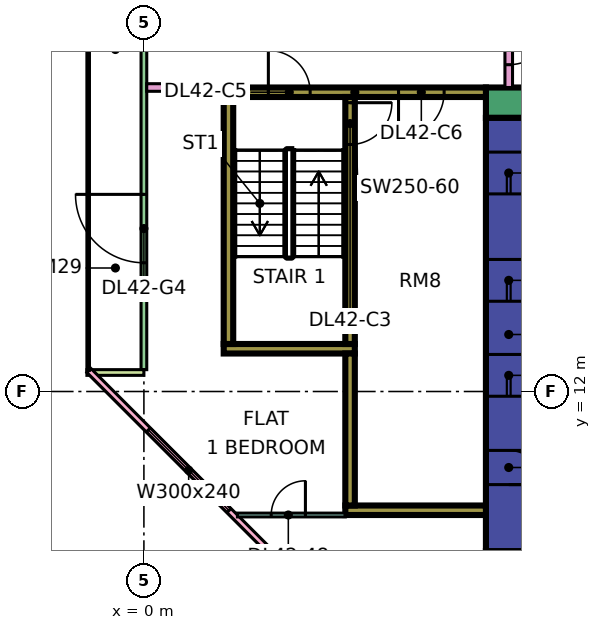
"""IFC4 building model, lengths in metres.
Left out: names, types, materials, properties, quantities, classifications, styles, units other than length and angle.
Written with IfcOpenShell. Run it as: python <this file> out.ifc"""

import sys

from ifc_helpers import new_model, si_unit, direction, frame, frame_2d, origin, place, context, subcontext, project, spatial, rectangle, extrude, element, fill, save


model = new_model("IFC4")
c1 = context("Model", 3, precision=1e-05, world=origin(), true_north=direction((0.0, 1.0)))
c2 = subcontext(c1, "Body", "Model", "MODEL_VIEW")
j1 = project(units=[si_unit("LENGTHUNIT", "METRE"), si_unit("PLANEANGLEUNIT", "RADIAN")], contexts=[c1])
p1 = place(None, origin())
s1 = spatial("IfcSite", under=j1, at=p1, CompositionType="ELEMENT")
p2 = place(p1, origin())
s2 = spatial("IfcBuilding", under=s1, at=p2, CompositionType="ELEMENT")
p3 = place(p2, frame((0.0, 0.0, 183.65)))
s3 = spatial("IfcBuildingStorey", under=s2, at=p3, CompositionType="ELEMENT", Elevation=183.65)
p4 = place(p3, frame((9.0, 19.6, 0.0), z_axis=(0.0, 0.0, 1.0), x_axis=(1.0, 0.0, 0.0)))
e1 = element("IfcWall", 1, at=p4, inside=s3, PredefinedType="SHEAR", context=c2, shape_type="SweptSolid", body=[
    extrude(rectangle(XDim=25.0, YDim=0.8, at=frame_2d((12.5, 0.0))), origin(), (0.0, 0.0, 1.0), 3.75),
])
p5 = place(p4, frame((19.1, 0.0, 0.0)))
e2 = element("IfcOpeningElement", 2, at=p5, cuts=e1, PredefinedType="OPENING", context=c2, shape_type="SweptSolid", body=[
    extrude(rectangle(XDim=1.8, YDim=2.4, at=frame_2d((0.9, 1.2))), frame((0.0, 0.41, 0.0), z_axis=(0.0, -1.0, 0.0), x_axis=(1.0, 0.0, 0.0)), (0.0, 0.0, 1.0), 0.82),
])
p6 = place(p3, frame((9.6, 7.8, 0.0), z_axis=(0.0, 0.0, 1.0), x_axis=(0.0, 1.0, 0.0)))
e3 = element("IfcWall", 3, at=p6, inside=s3, PredefinedType="SHEAR", context=c2, shape_type="SweptSolid", body=[
    extrude(rectangle(XDim=11.4, YDim=1.2, at=frame_2d((5.7, 0.0))), origin(), (0.0, 0.0, 1.0), 3.75),
])
p7 = place(p6, frame((4.075, 0.0, 0.0)))
e4 = element("IfcOpeningElement", 4, at=p7, cuts=e3, PredefinedType="OPENING", context=c2, shape_type="SweptSolid", body=[
    extrude(rectangle(XDim=1.1, YDim=2.2, at=frame_2d((0.55, 1.1))), frame((0.0, 0.61, 0.0), z_axis=(0.0, -1.0, 0.0), x_axis=(1.0, 0.0, 0.0)), (0.0, 0.0, 1.0), 1.22),
])
p8 = place(p6, frame((6.575, 0.0, 0.0)))
e5 = element("IfcOpeningElement", 5, at=p8, cuts=e3, PredefinedType="OPENING", context=c2, shape_type="SweptSolid", body=[
    extrude(rectangle(XDim=1.1, YDim=2.2, at=frame_2d((0.55, 1.1))), frame((0.0, 0.61, 0.0), z_axis=(0.0, -1.0, 0.0), x_axis=(1.0, 0.0, 0.0)), (0.0, 0.0, 1.0), 1.22),
])
p9 = place(p6, frame((9.4, 0.0, 0.0)))
e6 = element("IfcOpeningElement", 6, at=p9, cuts=e3, PredefinedType="OPENING", context=c2, shape_type="SweptSolid", body=[
    extrude(rectangle(XDim=1.1, YDim=2.2, at=frame_2d((0.55, 1.1))), frame((0.0, 0.61, 0.0), z_axis=(0.0, -1.0, 0.0), x_axis=(1.0, 0.0, 0.0)), (0.0, 0.0, 1.0), 1.22),
])
p10 = place(p6, frame((1.75, 0.0, 0.0)))
e7 = element("IfcOpeningElement", 7, at=p10, cuts=e3, PredefinedType="OPENING", context=c2, shape_type="SweptSolid", body=[
    extrude(rectangle(XDim=0.9, YDim=2.1, at=frame_2d((0.45, 1.05))), frame((0.0, 0.61, 0.0), z_axis=(0.0, -1.0, 0.0), x_axis=(1.0, 0.0, 0.0)), (0.0, 0.0, 1.0), 1.22),
])
p11 = place(p3, frame((2.1, 19.875, 0.0), z_axis=(0.0, 0.0, 1.0), x_axis=(1.0, 0.0, 0.0)))
e8 = element("IfcWall", 8, at=p11, inside=s3, PredefinedType="SHEAR", context=c2, shape_type="SweptSolid", body=[
    extrude(rectangle(XDim=6.9, YDim=0.25, at=frame_2d((3.45, 0.0))), origin(), (0.0, 0.0, 1.0), 3.75),
])
p12 = place(p11, frame((1.175, 0.0, 0.0)))
e9 = element("IfcOpeningElement", 9, at=p12, cuts=e8, PredefinedType="OPENING", context=c2, shape_type="SweptSolid", body=[
    extrude(rectangle(XDim=1.1, YDim=2.2, at=frame_2d((0.55, 1.1))), frame((0.0, 0.135, 0.0), z_axis=(0.0, -1.0, 0.0), x_axis=(1.0, 0.0, 0.0)), (0.0, 0.0, 1.0), 0.27),
])
p13 = place(p11, frame((4.6, 0.0, 0.0)))
e10 = element("IfcOpeningElement", 10, at=p13, cuts=e8, PredefinedType="OPENING", context=c2, shape_type="SweptSolid", body=[
    extrude(rectangle(XDim=1.2, YDim=2.2, at=frame_2d((0.6, 1.1))), frame((0.0, 0.135, 0.0), z_axis=(0.0, -1.0, 0.0), x_axis=(1.0, 0.0, 0.0)), (0.0, 0.0, 1.0), 0.27),
])
p14 = place(p3, frame((2.1, 13.125, 0.0), z_axis=(0.0, 0.0, 1.0), x_axis=(1.0, 0.0, 0.0)))
e11 = element("IfcWall", 11, at=p14, inside=s3, PredefinedType="SHEAR", context=c2, shape_type="SweptSolid", body=[
    extrude(rectangle(XDim=3.45, YDim=0.25, at=frame_2d((1.725, 0.0))), origin(), (0.0, 0.0, 1.0), 3.75),
])
p15 = place(p3, frame((2.225, 13.25, 0.0), z_axis=(0.0, 0.0, 1.0), x_axis=(0.0, 1.0, 0.0)))
e12 = element("IfcWall", 12, at=p15, inside=s3, PredefinedType="SHEAR", context=c2, shape_type="SweptSolid", body=[
    extrude(rectangle(XDim=6.5, YDim=0.25, at=frame_2d((3.25, 0.0))), origin(), (0.0, 0.0, 1.0), 3.75),
])
p16 = place(p3, frame((5.425, 13.25, 0.0), z_axis=(0.0, 0.0, 1.0), x_axis=(0.0, 1.0, 0.0)))
e13 = element("IfcWall", 13, at=p16, inside=s3, PredefinedType="SHEAR", context=c2, shape_type="SweptSolid", body=[
    extrude(rectangle(XDim=6.5, YDim=0.25, at=frame_2d((3.25, 0.0))), origin(), (0.0, 0.0, 1.0), 3.75),
])
p17 = place(p16, frame((5.25, 0.0, 0.0)))
e14 = element("IfcOpeningElement", 14, at=p17, cuts=e13, PredefinedType="OPENING", context=c2, shape_type="SweptSolid", body=[
    extrude(rectangle(XDim=1.1, YDim=2.2, at=frame_2d((0.55, 1.1))), frame((0.0, 0.135, 0.0), z_axis=(0.0, -1.0, 0.0), x_axis=(1.0, 0.0, 0.0)), (0.0, 0.0, 1.0), 0.27),
])
p18 = place(p3, frame((5.3, 8.875, 0.0), z_axis=(0.0, 0.0, 1.0), x_axis=(1.0, 0.0, 0.0)))
e15 = element("IfcWall", 15, at=p18, inside=s3, PredefinedType="SHEAR", context=c2, shape_type="SweptSolid", body=[
    extrude(rectangle(XDim=3.7, YDim=0.25, at=frame_2d((1.85, 0.0))), origin(), (0.0, 0.0, 1.0), 3.75),
])
p19 = place(p3, frame((5.425, 9.0, 0.0), z_axis=(0.0, 0.0, 1.0), x_axis=(0.0, 1.0, 0.0)))
e16 = element("IfcWall", 16, at=p19, inside=s3, PredefinedType="SHEAR", context=c2, shape_type="SweptSolid", body=[
    extrude(rectangle(XDim=4.0, YDim=0.25, at=frame_2d((2.0, 0.0))), origin(), (0.0, 0.0, 1.0), 3.75),
])
p20 = place(p3, frame((0.0, 23.925, 0.0), z_axis=(0.0, 0.0, 1.0), x_axis=(0.0, -1.0, 0.0)))
e17 = element("IfcWall", 17, at=p20, inside=s3, PredefinedType="SOLIDWALL", context=c2, shape_type="SweptSolid", body=[
    extrude(rectangle(XDim=11.35, YDim=0.15, at=frame_2d((5.675, 0.0))), origin(), (0.0, 0.0, 1.0), 3.35),
])
p21 = place(p20, frame((6.738, 0.0, 0.0)))
e18 = element("IfcOpeningElement", 18, at=p21, cuts=e17, PredefinedType="OPENING", context=c2, shape_type="SweptSolid", body=[
    extrude(rectangle(XDim=1.8, YDim=2.4, at=frame_2d((0.9, 1.2))), frame((0.0, 0.085, 0.0), z_axis=(0.0, -1.0, 0.0), x_axis=(1.0, 0.0, 0.0)), (0.0, 0.0, 1.0), 0.17),
])
p22 = place(p3, frame((-1.5, 12.5, 0.0), z_axis=(0.0, 0.0, 1.0), x_axis=(1.0, 0.0, 0.0)))
e19 = element("IfcWall", 19, at=p22, inside=s3, PredefinedType="SOLIDWALL", context=c2, shape_type="SweptSolid", body=[
    extrude(rectangle(XDim=1.5, YDim=0.15, at=frame_2d((0.75, 0.0))), origin(), (0.0, 0.0, 1.0), 3.35),
])
p23 = place(p3, frame((-1.447, 12.553, 0.0), z_axis=(0.0, 0.0, 1.0), x_axis=(0.707106781187, -0.707106781187, 0.0)))
e20 = element("IfcWall", 20, at=p23, inside=s3, PredefinedType="SOLIDWALL", context=c2, shape_type="SweptSolid", body=[
    extrude(rectangle(XDim=19.799, YDim=0.15, at=frame_2d((9.899, 0.0))), origin(), (0.0, 0.0, 1.0), 3.35),
])
p24 = place(p23, frame((2.212, 0.0, 0.45)))
e21 = element("IfcOpeningElement", 21, at=p24, cuts=e20, PredefinedType="OPENING", context=c2, shape_type="SweptSolid", body=[
    extrude(rectangle(XDim=3.0, YDim=2.4, at=frame_2d((1.5, 1.2))), frame((0.0, 0.085, 0.0), z_axis=(0.0, -1.0, 0.0), x_axis=(1.0, 0.0, 0.0)), (0.0, 0.0, 1.0), 0.17),
])
p25 = place(p23, frame((10.216, 0.0, 0.45)))
e22 = element("IfcOpeningElement", 22, at=p25, cuts=e20, PredefinedType="OPENING", context=c2, shape_type="SweptSolid", body=[
    extrude(rectangle(XDim=3.0, YDim=2.4, at=frame_2d((1.5, 1.2))), frame((0.0, 0.085, 0.0), z_axis=(0.0, -1.0, 0.0), x_axis=(1.0, 0.0, 0.0)), (0.0, 0.0, 1.0), 0.17),
])
p26 = place(p3, frame((0.074, 20.0, 0.0), z_axis=(0.0, 0.0, 1.0), x_axis=(1.0, 0.0, 0.0)))
e23 = element("IfcWall", 23, at=p26, inside=s3, PredefinedType="PARTITIONING", context=c2, shape_type="SweptSolid", body=[
    extrude(rectangle(XDim=2.026, YDim=0.2, at=frame_2d((1.013, 0.0))), origin(), (0.0, 0.0, 1.0), 3.35),
])
p27 = place(p3, frame((2.461, 8.75, 0.0), z_axis=(0.0, 0.0, 1.0), x_axis=(1.0, 0.0, 0.0)))
e24 = element("IfcWall", 24, at=p27, inside=s3, PredefinedType="PARTITIONING", context=c2, shape_type="SweptSolid", body=[
    extrude(rectangle(XDim=2.839, YDim=0.1, at=frame_2d((1.419, 0.0))), origin(), (0.0, 0.0, 1.0), 3.35),
])
p28 = place(p27, frame((0.889, 0.0, 0.0)))
e25 = element("IfcOpeningElement", 25, at=p28, cuts=e24, PredefinedType="OPENING", context=c2, shape_type="SweptSolid", body=[
    extrude(rectangle(XDim=0.9, YDim=2.1, at=frame_2d((0.45, 1.05))), frame((0.0, 0.06, 0.0), z_axis=(0.0, -1.0, 0.0), x_axis=(1.0, 0.0, 0.0)), (0.0, 0.0, 1.0), 0.12),
])
p29 = place(p3, frame((9.6, 20.0, 0.0), z_axis=(0.0, 0.0, 1.0), x_axis=(0.0, 1.0, 0.0)))
e26 = element("IfcWall", 26, at=p29, inside=s3, PredefinedType="PARTITIONING", context=c2, shape_type="SweptSolid", body=[
    extrude(rectangle(XDim=44.35, YDim=0.2, at=frame_2d((22.175, 0.0))), origin(), (0.0, 0.0, 1.0), 3.35),
])
p30 = place(p29, frame((16.8, 0.0, 0.0)))
e27 = element("IfcOpeningElement", 27, at=p30, cuts=e26, PredefinedType="OPENING", context=c2, shape_type="SweptSolid", body=[
    extrude(rectangle(XDim=1.0, YDim=2.1, at=frame_2d((0.5, 1.05))), frame((0.0, 0.11, 0.0), z_axis=(0.0, -1.0, 0.0), x_axis=(1.0, 0.0, 0.0)), (0.0, 0.0, 1.0), 0.22),
])
p31 = place(p29, frame((40.65, 0.0, 0.0)))
e28 = element("IfcOpeningElement", 28, at=p31, cuts=e26, PredefinedType="OPENING", context=c2, shape_type="SweptSolid", body=[
    extrude(rectangle(XDim=1.0, YDim=2.1, at=frame_2d((0.5, 1.05))), frame((0.0, 0.11, 0.0), z_axis=(0.0, -1.0, 0.0), x_axis=(1.0, 0.0, 0.0)), (0.0, 0.0, 1.0), 0.22),
])
p32 = place(p29, frame((0.6, 0.0, 0.0)))
e29 = element("IfcOpeningElement", 29, at=p32, cuts=e26, PredefinedType="OPENING", context=c2, shape_type="SweptSolid", body=[
    extrude(rectangle(XDim=1.2, YDim=2.1, at=frame_2d((0.6, 1.05))), frame((0.0, 0.11, 0.0), z_axis=(0.0, -1.0, 0.0), x_axis=(1.0, 0.0, 0.0)), (0.0, 0.0, 1.0), 0.22),
])
p33 = place(p29, frame((4.2, 0.0, 0.0)))
e30 = element("IfcOpeningElement", 30, at=p33, cuts=e26, PredefinedType="OPENING", context=c2, shape_type="SweptSolid", body=[
    extrude(rectangle(XDim=1.0, YDim=2.1, at=frame_2d((0.5, 1.05))), frame((0.0, 0.11, 0.0), z_axis=(0.0, -1.0, 0.0), x_axis=(1.0, 0.0, 0.0)), (0.0, 0.0, 1.0), 0.22),
])
p34 = place(p21, frame((1.8, 0.0, 0.0), z_axis=(0.0, 0.0, 1.0), x_axis=(-1.0, 0.0, 0.0)))
e31 = element("IfcDoor", 31, at=p34, inside=s3, OperationType="DOUBLE_DOOR_SINGLE_SWING", PredefinedType="DOOR", context=c2, shape_type="SweptSolid", body=[
    extrude(rectangle(XDim=1.8, YDim=2.4, at=frame_2d((0.9, 1.2))), frame((0.0, 0.025, 0.0), z_axis=(0.0, -1.0, 0.0), x_axis=(1.0, 0.0, 0.0)), (0.0, 0.0, 1.0), 0.05),
])
fill(e18, e31)
p35 = place(p24, origin())
e32 = element("IfcWindow", 32, at=p35, inside=s3, PartitioningType="SINGLE_PANEL", PredefinedType="WINDOW", context=c2, shape_type="SweptSolid", body=[
    extrude(rectangle(XDim=3.0, YDim=2.4, at=frame_2d((1.5, 1.2))), frame((0.0, 0.03, 0.0), z_axis=(0.0, -1.0, 0.0), x_axis=(1.0, 0.0, 0.0)), (0.0, 0.0, 1.0), 0.06),
])
fill(e21, e32)
p36 = place(p7, origin())
e33 = element("IfcDoor", 33, at=p36, inside=s3, OperationType="DOUBLE_DOOR_SLIDING", PredefinedType="DOOR", context=c2, shape_type="SweptSolid", body=[
    extrude(rectangle(XDim=1.1, YDim=2.2, at=frame_2d((0.55, 1.1))), frame((0.0, 0.025, 0.0), z_axis=(0.0, -1.0, 0.0), x_axis=(1.0, 0.0, 0.0)), (0.0, 0.0, 1.0), 0.05),
])
fill(e4, e33)
p37 = place(p8, origin())
e34 = element("IfcDoor", 34, at=p37, inside=s3, OperationType="DOUBLE_DOOR_SLIDING", PredefinedType="DOOR", context=c2, shape_type="SweptSolid", body=[
    extrude(rectangle(XDim=1.1, YDim=2.2, at=frame_2d((0.55, 1.1))), frame((0.0, 0.025, 0.0), z_axis=(0.0, -1.0, 0.0), x_axis=(1.0, 0.0, 0.0)), (0.0, 0.0, 1.0), 0.05),
])
fill(e5, e34)
p38 = place(p9, origin())
e35 = element("IfcDoor", 35, at=p38, inside=s3, OperationType="DOUBLE_DOOR_SLIDING", PredefinedType="DOOR", context=c2, shape_type="SweptSolid", body=[
    extrude(rectangle(XDim=1.1, YDim=2.2, at=frame_2d((0.55, 1.1))), frame((0.0, 0.025, 0.0), z_axis=(0.0, -1.0, 0.0), x_axis=(1.0, 0.0, 0.0)), (0.0, 0.0, 1.0), 0.05),
])
fill(e6, e35)
p39 = place(p17, origin())
e36 = element("IfcDoor", 36, at=p39, inside=s3, OperationType="SINGLE_SWING_RIGHT", PredefinedType="DOOR", context=c2, shape_type="SweptSolid", body=[
    extrude(rectangle(XDim=1.1, YDim=2.2, at=frame_2d((0.55, 1.1))), frame((0.0, 0.025, 0.0), z_axis=(0.0, -1.0, 0.0), x_axis=(1.0, 0.0, 0.0)), (0.0, 0.0, 1.0), 0.05),
])
fill(e14, e36)
p40 = place(p10, frame((0.9, 0.0, 0.0), z_axis=(0.0, 0.0, 1.0), x_axis=(-1.0, 0.0, 0.0)))
e37 = element("IfcDoor", 37, at=p40, inside=s3, OperationType="SINGLE_SWING_LEFT", PredefinedType="DOOR", context=c2, shape_type="SweptSolid", body=[
    extrude(rectangle(XDim=0.9, YDim=2.1, at=frame_2d((0.45, 1.05))), frame((0.0, 0.025, 0.0), z_axis=(0.0, -1.0, 0.0), x_axis=(1.0, 0.0, 0.0)), (0.0, 0.0, 1.0), 0.05),
])
fill(e7, e37)
p41 = place(p12, origin())
e38 = element("IfcDoor", 38, at=p41, inside=s3, OperationType="SINGLE_SWING_LEFT", PredefinedType="DOOR", context=c2, shape_type="SweptSolid", body=[
    extrude(rectangle(XDim=1.1, YDim=2.2, at=frame_2d((0.55, 1.1))), frame((0.0, 0.025, 0.0), z_axis=(0.0, -1.0, 0.0), x_axis=(1.0, 0.0, 0.0)), (0.0, 0.0, 1.0), 0.05),
])
fill(e9, e38)
p42 = place(p13, frame((1.2, 0.0, 0.0), z_axis=(0.0, 0.0, 1.0), x_axis=(-1.0, 0.0, 0.0)))
e39 = element("IfcDoor", 39, at=p42, inside=s3, OperationType="SINGLE_SWING_LEFT", PredefinedType="DOOR", context=c2, shape_type="SweptSolid", body=[
    extrude(rectangle(XDim=1.2, YDim=2.2, at=frame_2d((0.6, 1.1))), frame((0.0, 0.025, 0.0), z_axis=(0.0, -1.0, 0.0), x_axis=(1.0, 0.0, 0.0)), (0.0, 0.0, 1.0), 0.05),
])
fill(e10, e39)
p43 = place(p32, origin())
e40 = element("IfcDoor", 40, at=p43, inside=s3, OperationType="SINGLE_SWING_RIGHT", PredefinedType="DOOR", context=c2, shape_type="SweptSolid", body=[
    extrude(rectangle(XDim=1.2, YDim=2.1, at=frame_2d((0.6, 1.05))), frame((0.0, 0.025, 0.0), z_axis=(0.0, -1.0, 0.0), x_axis=(1.0, 0.0, 0.0)), (0.0, 0.0, 1.0), 0.05),
])
fill(e29, e40)
p44 = place(p28, frame((0.9, 0.0, 0.0), z_axis=(0.0, 0.0, 1.0), x_axis=(-1.0, 0.0, 0.0)))
e41 = element("IfcDoor", 41, at=p44, inside=s3, OperationType="SINGLE_SWING_RIGHT", PredefinedType="DOOR", context=c2, shape_type="SweptSolid", body=[
    extrude(rectangle(XDim=0.9, YDim=2.1, at=frame_2d((0.45, 1.05))), frame((0.0, 0.025, 0.0), z_axis=(0.0, -1.0, 0.0), x_axis=(1.0, 0.0, 0.0)), (0.0, 0.0, 1.0), 0.05),
])
fill(e25, e41)
save(model, sys.argv[1])
